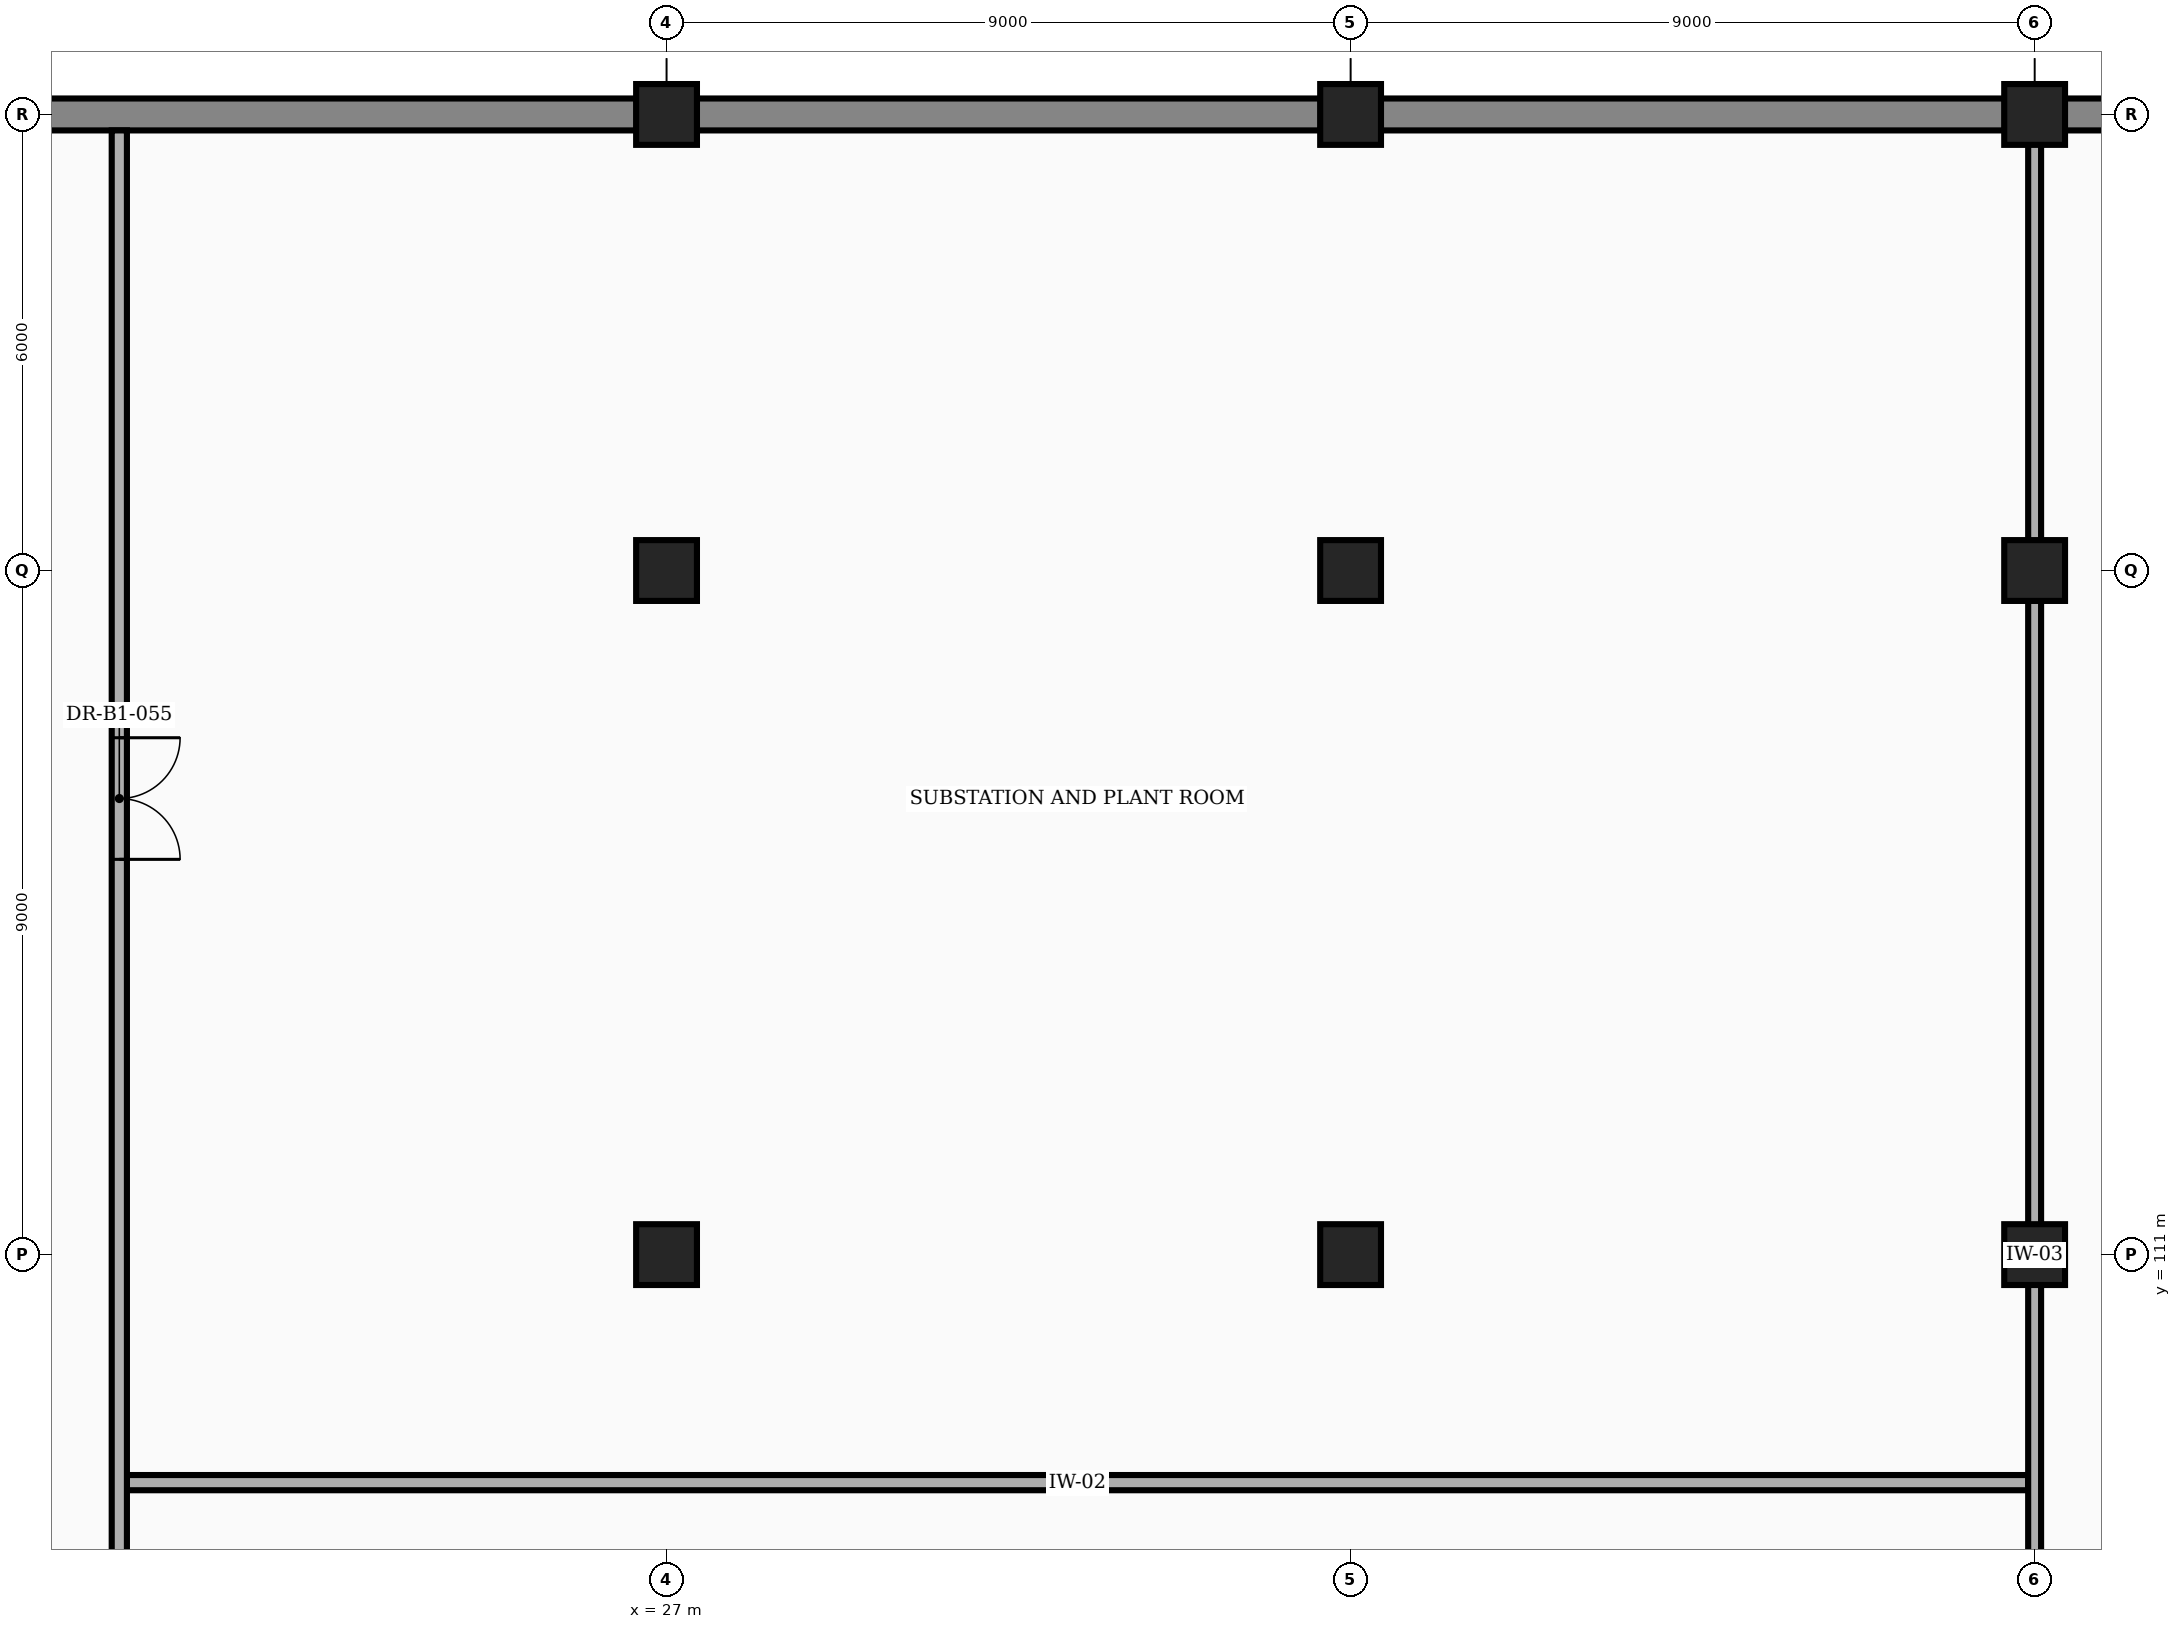
"""IFC4 building model, lengths in metres.
Left out: names, types, materials, properties, quantities, classifications, styles, units other than length and angle.
Written with IfcOpenShell. Run it as: python <this file> out.ifc"""

import sys

from ifc_helpers import new_model, si_unit, direction, frame, frame_2d, origin, origin_2d, place, context, subcontext, project, spatial, rectangle, extrude, element, fill, save


model = new_model("IFC4")
c1 = context("Model", 3, precision=1e-05, world=origin(), true_north=direction((0.0, 1.0)))
c2 = subcontext(c1, "Body", "Model", "MODEL_VIEW")
j1 = project(units=[si_unit("LENGTHUNIT", "METRE"), si_unit("PLANEANGLEUNIT", "RADIAN")], contexts=[c1])
p1 = place(None, origin())
s1 = spatial("IfcSite", under=j1, at=p1, CompositionType="ELEMENT")
p2 = place(p1, origin())
s2 = spatial("IfcBuilding", under=s1, at=p2, CompositionType="ELEMENT")
p3 = place(p2, frame((0.0, 0.0, -4.5)))
s3 = spatial("IfcBuildingStorey", under=s2, at=p3, CompositionType="ELEMENT", Elevation=-4.5)
for number, where, z_axis, x_axis in (
    (1, (27.0, 111.0, -0.45), (0.0, 0.0, 1.0), (1.0, 0.0, 0.0)),
    (2, (27.0, 120.0, -0.45), (0.0, 0.0, 1.0), (1.0, 0.0, 0.0)),
    (3, (27.0, 126.0, -0.45), (0.0, 0.0, 1.0), (1.0, 0.0, 0.0)),
    (4, (36.0, 111.0, -0.45), (0.0, 0.0, 1.0), (1.0, 0.0, 0.0)),
    (5, (36.0, 120.0, -0.45), (0.0, 0.0, 1.0), (1.0, 0.0, 0.0)),
    (6, (36.0, 126.0, -0.45), (0.0, 0.0, 1.0), (1.0, 0.0, 0.0)),
    (7, (45.0, 111.0, -0.45), (0.0, 0.0, 1.0), (1.0, 0.0, 0.0)),
    (8, (45.0, 120.0, -0.45), (0.0, 0.0, 1.0), (1.0, 0.0, 0.0)),
    (9, (45.0, 126.0, -0.45), (0.0, 0.0, 1.0), (1.0, 0.0, 0.0)),
):
    element("IfcColumn", number, at=place(p3, frame(where, z_axis=z_axis, x_axis=x_axis)), inside=s3, PredefinedType="COLUMN", context=c2, shape_type="SweptSolid", body=[
        extrude(rectangle(XDim=0.8, YDim=0.8, at=origin_2d()), origin(), (0.0, 0.0, 1.0), 4.95),
    ])
p4 = place(p3, frame((9.392, 126.0, 0.0), z_axis=(0.0, 0.0, 1.0), x_axis=(1.0, 0.0, 0.0)))
e10 = element("IfcWall", 10, at=p4, inside=s3, PredefinedType="STANDARD", context=c2, shape_type="SweptSolid", body=[
    extrude(rectangle(XDim=17.216, YDim=0.42, at=frame_2d((8.608, 0.0))), origin(), (0.0, 0.0, 1.0), 3.7),
])
for number, where, z_axis, x_axis in (
    (11, (27.392, 126.0, 0.0), (0.0, 0.0, 1.0), (1.0, 0.0, 0.0)),
    (12, (36.392, 126.0, 0.0), (0.0, 0.0, 1.0), (1.0, 0.0, 0.0)),
):
    element("IfcWall", number, at=place(p3, frame(where, z_axis=z_axis, x_axis=x_axis)), inside=s3, PredefinedType="STANDARD", context=c2, shape_type="SweptSolid", body=[
        extrude(rectangle(XDim=8.216, YDim=0.42, at=frame_2d((4.108, 0.0))), origin(), (0.0, 0.0, 1.0), 3.7),
    ])
p5 = place(p3, frame((45.392, 126.0, 0.0), z_axis=(0.0, 0.0, 1.0), x_axis=(1.0, 0.0, 0.0)))
e13 = element("IfcWall", 13, at=p5, inside=s3, PredefinedType="STANDARD", context=c2, shape_type="SweptSolid", body=[
    extrude(rectangle(XDim=17.216, YDim=0.42, at=frame_2d((8.608, 0.0))), origin(), (0.0, 0.0, 1.0), 3.7),
])
p6 = place(p3, frame((19.9, 108.0, 0.0), z_axis=(0.0, 0.0, 1.0), x_axis=(1.0, 0.0, 0.0)))
e14 = element("IfcWall", 14, at=p6, inside=s3, PredefinedType="PARTITIONING", context=c2, shape_type="SweptSolid", body=[
    extrude(rectangle(XDim=25.015, YDim=0.2, at=frame_2d((12.508, 0.0))), origin(), (0.0, 0.0, 1.0), 4.24),
])
p7 = place(p3, frame((19.8, 80.76, 0.0), z_axis=(0.0, 0.0, 1.0), x_axis=(0.0, 1.0, 0.0)))
e15 = element("IfcWall", 15, at=p7, inside=s3, PredefinedType="PARTITIONING", context=c2, shape_type="SweptSolid", body=[
    extrude(rectangle(XDim=45.03, YDim=0.2, at=frame_2d((22.515, 0.0))), origin(), (0.0, 0.0, 1.0), 4.24),
])
p8 = place(p7, frame((6.89, 0.0, 0.0)))
e16 = element("IfcOpeningElement", 16, at=p8, cuts=e15, PredefinedType="OPENING", context=c2, shape_type="SweptSolid", body=[
    extrude(rectangle(XDim=1.5, YDim=2.2, at=frame_2d((0.75, 1.1))), frame((0.0, 0.112, 0.0), z_axis=(0.0, -1.0, 0.0), x_axis=(1.0, 0.0, 0.0)), (0.0, 0.0, 1.0), 0.224),
])
p9 = place(p7, frame((17.5, 0.0, 0.0)))
e17 = element("IfcOpeningElement", 17, at=p9, cuts=e15, PredefinedType="OPENING", context=c2, shape_type="SweptSolid", body=[
    extrude(rectangle(XDim=1.05, YDim=2.15, at=frame_2d((0.525, 1.075))), frame((0.0, 0.112, 0.0), z_axis=(0.0, -1.0, 0.0), x_axis=(1.0, 0.0, 0.0)), (0.0, 0.0, 1.0), 0.224),
])
p10 = place(p7, frame((35.44, 0.0, 0.0)))
e18 = element("IfcOpeningElement", 18, at=p10, cuts=e15, PredefinedType="OPENING", context=c2, shape_type="SweptSolid", body=[
    extrude(rectangle(XDim=1.6, YDim=2.3, at=frame_2d((0.8, 1.15))), frame((0.0, 0.112, 0.0), z_axis=(0.0, -1.0, 0.0), x_axis=(1.0, 0.0, 0.0)), (0.0, 0.0, 1.0), 0.224),
])
p11 = place(p7, frame((21.665, 0.0, 0.0)))
e19 = element("IfcOpeningElement", 19, at=p11, cuts=e15, PredefinedType="OPENING", context=c2, shape_type="SweptSolid", body=[
    extrude(rectangle(XDim=1.7, YDim=2.3, at=frame_2d((0.85, 1.15))), frame((0.0, 0.112, 0.0), z_axis=(0.0, -1.0, 0.0), x_axis=(1.0, 0.0, 0.0)), (0.0, 0.0, 1.0), 0.224),
])
p12 = place(p7, frame((0.3, 0.0, 0.0)))
e20 = element("IfcOpeningElement", 20, at=p12, cuts=e15, PredefinedType="OPENING", context=c2, shape_type="SweptSolid", body=[
    extrude(rectangle(XDim=1.7, YDim=2.3, at=frame_2d((0.85, 1.15))), frame((0.0, 0.112, 0.0), z_axis=(0.0, -1.0, 0.0), x_axis=(1.0, 0.0, 0.0)), (0.0, 0.0, 1.0), 0.224),
])
p13 = place(p3, frame((45.0, 102.22, 0.0), z_axis=(0.0, 0.0, 1.0), x_axis=(0.0, 1.0, 0.0)))
e21 = element("IfcWall", 21, at=p13, inside=s3, PredefinedType="PARTITIONING", context=c2, shape_type="SweptSolid", body=[
    extrude(rectangle(XDim=17.56, YDim=0.17, at=frame_2d((8.78, 0.0))), origin(), (0.0, 0.0, 1.0), 3.707),
])
p14 = place(p3, frame((45.0, 120.22, 0.0), z_axis=(0.0, 0.0, 1.0), x_axis=(0.0, 1.0, 0.0)))
e22 = element("IfcWall", 22, at=p14, inside=s3, PredefinedType="PARTITIONING", context=c2, shape_type="SweptSolid", body=[
    extrude(rectangle(XDim=5.56, YDim=0.17, at=frame_2d((2.78, 0.0))), origin(), (0.0, 0.0, 1.0), 3.709),
])
p15 = place(p10, frame((1.6, 0.0, 0.0), z_axis=(0.0, 0.0, 1.0), x_axis=(-1.0, 0.0, 0.0)))
e23 = element("IfcDoor", 23, at=p15, inside=s3, OperationType="DOUBLE_DOOR_SINGLE_SWING", PredefinedType="DOOR", context=c2, shape_type="SweptSolid", body=[
    extrude(rectangle(XDim=1.6, YDim=2.3, at=frame_2d((0.8, 1.15))), frame((0.0, 0.025, 0.0), z_axis=(0.0, -1.0, 0.0), x_axis=(1.0, 0.0, 0.0)), (0.0, 0.0, 1.0), 0.05),
])
fill(e18, e23)
save(model, sys.argv[1])
